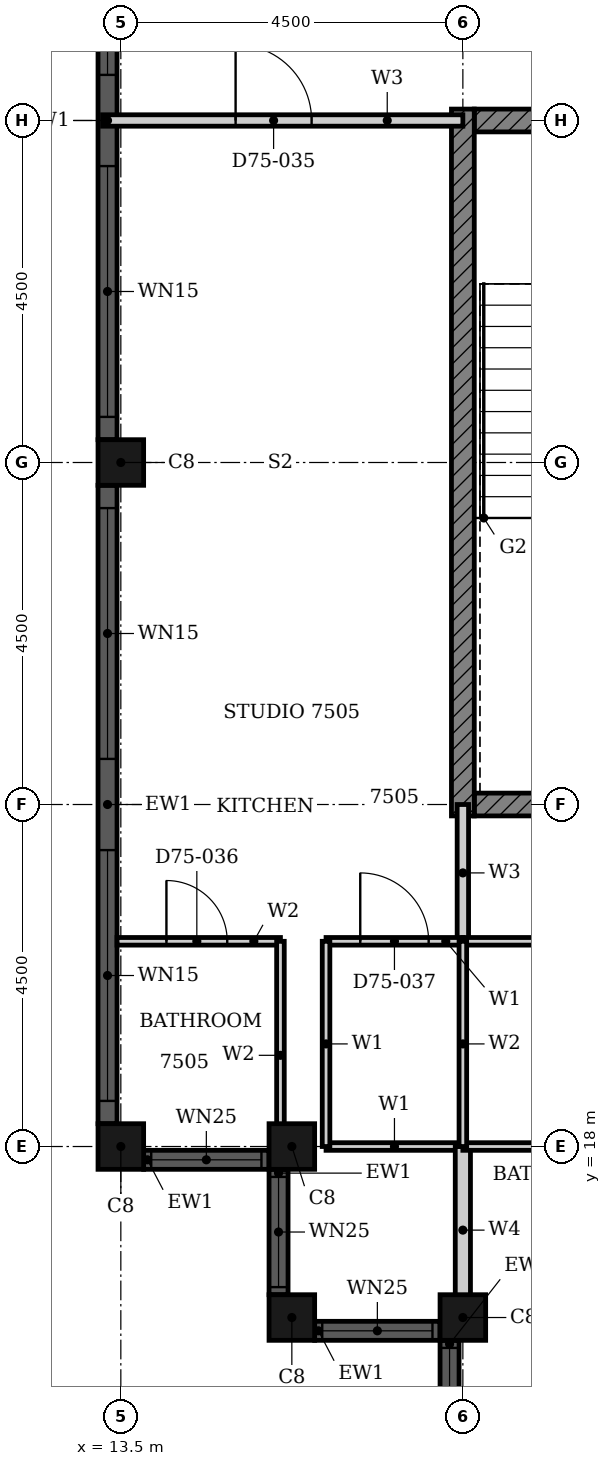
"""IFC4 building model, lengths in metres.
Left out: names, types, materials, properties, quantities, classifications, styles, units other than length and angle.
Written with IfcOpenShell. Run it as: python <this file> out.ifc"""

import sys

from ifc_helpers import new_model, si_unit, direction, frame, frame_2d, origin, origin_2d, place, context, subcontext, project, spatial, rectangle, hollow_rectangle, extrude, element, fill, save


model = new_model("IFC4")
c1 = context("Model", 3, precision=1e-05, world=origin(), true_north=direction((0.0, 1.0)))
c2 = subcontext(c1, "Body", "Model", "MODEL_VIEW")
j1 = project(units=[si_unit("LENGTHUNIT", "METRE"), si_unit("PLANEANGLEUNIT", "RADIAN")], contexts=[c1])
p1 = place(None, origin())
s1 = spatial("IfcSite", under=j1, at=p1, CompositionType="ELEMENT")
p2 = place(p1, origin())
s2 = spatial("IfcBuilding", under=s1, at=p2, CompositionType="ELEMENT")
p3 = place(p2, frame((0.0, 0.0, 294.5)))
s3 = spatial("IfcBuildingStorey", under=s2, at=p3, CompositionType="ELEMENT", Elevation=294.5)
for number, where, z_axis, x_axis in (
    (1, (13.5, 27.0, 0.0), (0.0, 0.0, 1.0), (1.0, 0.0, 0.0)),
    (2, (13.5, 18.0, 0.0), (0.0, 0.0, 1.0), (1.0, 0.0, 0.0)),
    (3, (15.75, 18.0, 0.0), (0.0, 0.0, 1.0), (1.0, 0.0, 0.0)),
    (4, (15.75, 15.75, 0.0), (0.0, 0.0, 1.0), (1.0, 0.0, 0.0)),
    (5, (18.0, 15.75, 0.0), (0.0, 0.0, 1.0), (1.0, 0.0, 0.0)),
):
    element("IfcColumn", number, at=place(p3, frame(where, z_axis=z_axis, x_axis=x_axis)), inside=s3, PredefinedType="COLUMN", context=c2, shape_type="SweptSolid", body=[
        extrude(hollow_rectangle(XDim=0.6, YDim=0.6, WallThickness=0.02, at=origin_2d()), origin(), (0.0, 0.0, 1.0), 3.7),
    ])
p4 = place(p3, frame((13.325, 35.7, 0.0), z_axis=(0.0, 0.0, 1.0), x_axis=(0.0, -1.0, 0.0)))
e6 = element("IfcWall", 6, at=p4, inside=s3, PredefinedType="SOLIDWALL", context=c2, shape_type="SweptSolid", body=[
    extrude(rectangle(XDim=8.4, YDim=0.25, at=frame_2d((4.2, 0.0))), origin(), (0.0, 0.0, 1.0), 3.7),
])
p5 = place(p4, frame((0.3, 0.0, 0.45)))
e7 = element("IfcOpeningElement", 7, at=p5, cuts=e6, PredefinedType="OPENING", context=c2, shape_type="SweptSolid", body=[
    extrude(rectangle(XDim=3.3, YDim=2.3, at=frame_2d((1.65, 1.15))), frame((0.0, 0.135, 0.0), z_axis=(0.0, -1.0, 0.0), x_axis=(1.0, 0.0, 0.0)), (0.0, 0.0, 1.0), 0.27),
])
p6 = place(p4, frame((4.8, 0.0, 0.45)))
e8 = element("IfcOpeningElement", 8, at=p6, cuts=e6, PredefinedType="OPENING", context=c2, shape_type="SweptSolid", body=[
    extrude(rectangle(XDim=3.3, YDim=2.3, at=frame_2d((1.65, 1.15))), frame((0.0, 0.135, 0.0), z_axis=(0.0, -1.0, 0.0), x_axis=(1.0, 0.0, 0.0)), (0.0, 0.0, 1.0), 0.27),
])
p7 = place(p3, frame((13.325, 26.7, 0.0), z_axis=(0.0, 0.0, 1.0), x_axis=(0.0, -1.0, 0.0)))
e9 = element("IfcWall", 9, at=p7, inside=s3, PredefinedType="SOLIDWALL", context=c2, shape_type="SweptSolid", body=[
    extrude(rectangle(XDim=8.4, YDim=0.25, at=frame_2d((4.2, 0.0))), origin(), (0.0, 0.0, 1.0), 3.7),
])
p8 = place(p7, frame((0.3, 0.0, 0.45)))
e10 = element("IfcOpeningElement", 10, at=p8, cuts=e9, PredefinedType="OPENING", context=c2, shape_type="SweptSolid", body=[
    extrude(rectangle(XDim=3.3, YDim=2.3, at=frame_2d((1.65, 1.15))), frame((0.0, 0.135, 0.0), z_axis=(0.0, -1.0, 0.0), x_axis=(1.0, 0.0, 0.0)), (0.0, 0.0, 1.0), 0.27),
])
p9 = place(p7, frame((4.8, 0.0, 0.45)))
e11 = element("IfcOpeningElement", 11, at=p9, cuts=e9, PredefinedType="OPENING", context=c2, shape_type="SweptSolid", body=[
    extrude(rectangle(XDim=3.3, YDim=2.3, at=frame_2d((1.65, 1.15))), frame((0.0, 0.135, 0.0), z_axis=(0.0, -1.0, 0.0), x_axis=(1.0, 0.0, 0.0)), (0.0, 0.0, 1.0), 0.27),
])
p10 = place(p3, frame((13.8, 17.825, 0.0), z_axis=(0.0, 0.0, 1.0), x_axis=(1.0, 0.0, 0.0)))
e12 = element("IfcWall", 12, at=p10, inside=s3, PredefinedType="SOLIDWALL", context=c2, shape_type="SweptSolid", body=[
    extrude(rectangle(XDim=1.65, YDim=0.25, at=frame_2d((0.825, 0.0))), origin(), (0.0, 0.0, 1.0), 3.7),
])
p11 = place(p10, frame((0.1, 0.0, 0.9)))
e13 = element("IfcOpeningElement", 13, at=p11, cuts=e12, PredefinedType="OPENING", context=c2, shape_type="SweptSolid", body=[
    extrude(rectangle(XDim=1.45, YDim=1.85, at=frame_2d((0.725, 0.925))), frame((0.0, 0.135, 0.0), z_axis=(0.0, -1.0, 0.0), x_axis=(1.0, 0.0, 0.0)), (0.0, 0.0, 1.0), 0.27),
])
p12 = place(p3, frame((15.575, 17.7, 0.0), z_axis=(0.0, 0.0, 1.0), x_axis=(0.0, -1.0, 0.0)))
e14 = element("IfcWall", 14, at=p12, inside=s3, PredefinedType="SOLIDWALL", context=c2, shape_type="SweptSolid", body=[
    extrude(rectangle(XDim=1.65, YDim=0.25, at=frame_2d((0.825, 0.0))), origin(), (0.0, 0.0, 1.0), 3.7),
])
p13 = place(p12, frame((0.1, 0.0, 0.9)))
e15 = element("IfcOpeningElement", 15, at=p13, cuts=e14, PredefinedType="OPENING", context=c2, shape_type="SweptSolid", body=[
    extrude(rectangle(XDim=1.45, YDim=1.85, at=frame_2d((0.725, 0.925))), frame((0.0, 0.135, 0.0), z_axis=(0.0, -1.0, 0.0), x_axis=(1.0, 0.0, 0.0)), (0.0, 0.0, 1.0), 0.27),
])
p14 = place(p3, frame((16.05, 15.575, 0.0), z_axis=(0.0, 0.0, 1.0), x_axis=(1.0, 0.0, 0.0)))
e16 = element("IfcWall", 16, at=p14, inside=s3, PredefinedType="SOLIDWALL", context=c2, shape_type="SweptSolid", body=[
    extrude(rectangle(XDim=1.65, YDim=0.25, at=frame_2d((0.825, 0.0))), origin(), (0.0, 0.0, 1.0), 3.7),
])
p15 = place(p14, frame((0.1, 0.0, 0.9)))
e17 = element("IfcOpeningElement", 17, at=p15, cuts=e16, PredefinedType="OPENING", context=c2, shape_type="SweptSolid", body=[
    extrude(rectangle(XDim=1.45, YDim=1.85, at=frame_2d((0.725, 0.925))), frame((0.0, 0.135, 0.0), z_axis=(0.0, -1.0, 0.0), x_axis=(1.0, 0.0, 0.0)), (0.0, 0.0, 1.0), 0.27),
])
p16 = place(p3, frame((17.825, 15.45, 0.0), z_axis=(0.0, 0.0, 1.0), x_axis=(0.0, -1.0, 0.0)))
e18 = element("IfcWall", 18, at=p16, inside=s3, PredefinedType="SOLIDWALL", context=c2, shape_type="SweptSolid", body=[
    extrude(rectangle(XDim=1.65, YDim=0.25, at=frame_2d((0.825, 0.0))), origin(), (0.0, 0.0, 1.0), 3.7),
])
p17 = place(p16, frame((0.1, 0.0, 0.9)))
e19 = element("IfcOpeningElement", 19, at=p17, cuts=e18, PredefinedType="OPENING", context=c2, shape_type="SweptSolid", body=[
    extrude(rectangle(XDim=1.45, YDim=1.85, at=frame_2d((0.725, 0.925))), frame((0.0, 0.135, 0.0), z_axis=(0.0, -1.0, 0.0), x_axis=(1.0, 0.0, 0.0)), (0.0, 0.0, 1.0), 0.27),
])
p18 = place(p3, frame((18.15, 22.5, 0.0), z_axis=(0.0, 0.0, 1.0), x_axis=(1.0, 0.0, 0.0)))
e20 = element("IfcWall", 20, at=p18, inside=s3, PredefinedType="SHEAR", context=c2, shape_type="SweptSolid", body=[
    extrude(rectangle(XDim=4.225, YDim=0.3, at=frame_2d((2.113, 0.0))), origin(), (0.0, 0.0, 1.0), 3.4),
])
p19 = place(p3, frame((18.15, 31.5, 0.0), z_axis=(0.0, 0.0, 1.0), x_axis=(1.0, 0.0, 0.0)))
e21 = element("IfcWall", 21, at=p19, inside=s3, PredefinedType="SHEAR", context=c2, shape_type="SweptSolid", body=[
    extrude(rectangle(XDim=9.368, YDim=0.3, at=frame_2d((4.684, 0.0))), origin(), (0.0, 0.0, 1.0), 3.4),
])
p20 = place(p19, frame((4.736, 0.0, 0.0)))
e22 = element("IfcOpeningElement", 22, at=p20, cuts=e21, PredefinedType="OPENING", context=c2, shape_type="SweptSolid", body=[
    extrude(rectangle(XDim=1.8, YDim=2.1, at=frame_2d((0.9, 1.05))), frame((0.0, 0.16, 0.0), z_axis=(0.0, -1.0, 0.0), x_axis=(1.0, 0.0, 0.0)), (0.0, 0.0, 1.0), 0.32),
])
p21 = place(p3, frame((18.0, 22.35, 0.0), z_axis=(0.0, 0.0, 1.0), x_axis=(0.0, 1.0, 0.0)))
e23 = element("IfcWall", 23, at=p21, inside=s3, PredefinedType="SHEAR", context=c2, shape_type="SweptSolid", body=[
    extrude(rectangle(XDim=9.3, YDim=0.3, at=frame_2d((4.65, 0.0))), origin(), (0.0, 0.0, 1.0), 3.4),
])
p22 = place(p3, frame((13.26, 31.5, 0.0), z_axis=(0.0, 0.0, 1.0), x_axis=(1.0, 0.0, 0.0)))
e24 = element("IfcWall", 24, at=p22, inside=s3, PredefinedType="PARTITIONING", context=c2, shape_type="SweptSolid", body=[
    extrude(rectangle(XDim=4.74, YDim=0.15, at=frame_2d((2.37, 0.0))), origin(), (0.0, 0.0, 1.0), 3.4),
])
p23 = place(p22, frame((1.75, 0.0, 0.0)))
e25 = element("IfcOpeningElement", 25, at=p23, cuts=e24, PredefinedType="OPENING", context=c2, shape_type="SweptSolid", body=[
    extrude(rectangle(XDim=1.0, YDim=2.2, at=frame_2d((0.5, 1.1))), frame((0.0, 0.085, 0.0), z_axis=(0.0, -1.0, 0.0), x_axis=(1.0, 0.0, 0.0)), (0.0, 0.0, 1.0), 0.17),
])
p24 = place(p3, frame((18.0, 20.7, 0.0), z_axis=(0.0, 0.0, 1.0), x_axis=(0.0, 1.0, 0.0)))
e26 = element("IfcWall", 26, at=p24, inside=s3, PredefinedType="PARTITIONING", context=c2, shape_type="SweptSolid", body=[
    extrude(rectangle(XDim=1.8, YDim=0.15, at=frame_2d((0.9, 0.0))), origin(), (0.0, 0.0, 1.0), 3.4),
])
p25 = place(p3, frame((16.2, 18.0, 0.0), z_axis=(0.0, 0.0, 1.0), x_axis=(1.0, 0.0, 0.0)))
e27 = element("IfcWall", 27, at=p25, inside=s3, PredefinedType="PARTITIONING", context=c2, shape_type="SweptSolid", body=[
    extrude(rectangle(XDim=1.8, YDim=0.1, at=frame_2d((0.9, 0.0))), origin(), (0.0, 0.0, 1.0), 3.4),
])
p26 = place(p3, frame((16.2, 20.7, 0.0), z_axis=(0.0, 0.0, 1.0), x_axis=(1.0, 0.0, 0.0)))
e28 = element("IfcWall", 28, at=p26, inside=s3, PredefinedType="PARTITIONING", context=c2, shape_type="SweptSolid", body=[
    extrude(rectangle(XDim=1.8, YDim=0.1, at=frame_2d((0.9, 0.0))), origin(), (0.0, 0.0, 1.0), 3.4),
])
p27 = place(p26, frame((0.45, 0.0, 0.0)))
e29 = element("IfcOpeningElement", 29, at=p27, cuts=e28, PredefinedType="OPENING", context=c2, shape_type="SweptSolid", body=[
    extrude(rectangle(XDim=0.9, YDim=2.1, at=frame_2d((0.45, 1.05))), frame((0.0, 0.06, 0.0), z_axis=(0.0, -1.0, 0.0), x_axis=(1.0, 0.0, 0.0)), (0.0, 0.0, 1.0), 0.12),
])
p28 = place(p3, frame((16.2, 18.0, 0.0), z_axis=(0.0, 0.0, 1.0), x_axis=(0.0, 1.0, 0.0)))
e30 = element("IfcWall", 30, at=p28, inside=s3, PredefinedType="PARTITIONING", context=c2, shape_type="SweptSolid", body=[
    extrude(rectangle(XDim=2.7, YDim=0.1, at=frame_2d((1.35, 0.0))), origin(), (0.0, 0.0, 1.0), 3.4),
])
p29 = place(p3, frame((18.0, 15.8, 0.0), z_axis=(0.0, 0.0, 1.0), x_axis=(0.0, 1.0, 0.0)))
e31 = element("IfcWall", 31, at=p29, inside=s3, PredefinedType="PARTITIONING", context=c2, shape_type="SweptSolid", body=[
    extrude(rectangle(XDim=2.2, YDim=0.2, at=frame_2d((1.1, 0.0))), origin(), (0.0, 0.0, 1.0), 3.4),
])
for number, where, z_axis, x_axis in (
    (32, (18.0, 18.0, 0.0), (0.0, 0.0, 1.0), (1.0, 0.0, 0.0)),
    (33, (18.0, 20.7, 0.0), (0.0, 0.0, 1.0), (1.0, 0.0, 0.0)),
):
    element("IfcWall", number, at=place(p3, frame(where, z_axis=z_axis, x_axis=x_axis)), inside=s3, PredefinedType="PARTITIONING", context=c2, shape_type="SweptSolid", body=[
        extrude(rectangle(XDim=2.4, YDim=0.1, at=frame_2d((1.2, 0.0))), origin(), (0.0, 0.0, 1.0), 3.4),
    ])
p30 = place(p3, frame((13.45, 20.7, 0.0), z_axis=(0.0, 0.0, 1.0), x_axis=(1.0, 0.0, 0.0)))
e34 = element("IfcWall", 34, at=p30, inside=s3, PredefinedType="PARTITIONING", context=c2, shape_type="SweptSolid", body=[
    extrude(rectangle(XDim=2.15, YDim=0.1, at=frame_2d((1.075, 0.0))), origin(), (0.0, 0.0, 1.0), 3.4),
])
p31 = place(p30, frame((0.65, 0.0, 0.0)))
e35 = element("IfcOpeningElement", 35, at=p31, cuts=e34, PredefinedType="OPENING", context=c2, shape_type="SweptSolid", body=[
    extrude(rectangle(XDim=0.8, YDim=2.1, at=frame_2d((0.4, 1.05))), frame((0.0, 0.06, 0.0), z_axis=(0.0, -1.0, 0.0), x_axis=(1.0, 0.0, 0.0)), (0.0, 0.0, 1.0), 0.12),
])
p32 = place(p3, frame((15.6, 17.7, 0.0), z_axis=(0.0, 0.0, 1.0), x_axis=(0.0, 1.0, 0.0)))
e36 = element("IfcWall", 36, at=p32, inside=s3, PredefinedType="PARTITIONING", context=c2, shape_type="SweptSolid", body=[
    extrude(rectangle(XDim=3.0, YDim=0.1, at=frame_2d((1.5, 0.0))), origin(), (0.0, 0.0, 1.0), 3.4),
])
p33 = place(p3, frame((18.0, 18.0, 0.0), z_axis=(0.0, 0.0, 1.0), x_axis=(0.0, 1.0, 0.0)))
e37 = element("IfcWall", 37, at=p33, inside=s3, PredefinedType="PARTITIONING", context=c2, shape_type="SweptSolid", body=[
    extrude(rectangle(XDim=2.7, YDim=0.1, at=frame_2d((1.35, 0.0))), origin(), (0.0, 0.0, 1.0), 3.4),
])
p34 = place(p5, origin())
e38 = element("IfcWindow", 38, at=p34, inside=s3, PartitioningType="SINGLE_PANEL", PredefinedType="WINDOW", context=c2, shape_type="SweptSolid", body=[
    extrude(rectangle(XDim=3.3, YDim=2.3, at=frame_2d((1.65, 1.15))), frame((0.0, 0.03, 0.0), z_axis=(0.0, -1.0, 0.0), x_axis=(1.0, 0.0, 0.0)), (0.0, 0.0, 1.0), 0.06),
])
fill(e7, e38)
p35 = place(p6, origin())
e39 = element("IfcWindow", 39, at=p35, inside=s3, PartitioningType="SINGLE_PANEL", PredefinedType="WINDOW", context=c2, shape_type="SweptSolid", body=[
    extrude(rectangle(XDim=3.3, YDim=2.3, at=frame_2d((1.65, 1.15))), frame((0.0, 0.03, 0.0), z_axis=(0.0, -1.0, 0.0), x_axis=(1.0, 0.0, 0.0)), (0.0, 0.0, 1.0), 0.06),
])
fill(e8, e39)
p36 = place(p8, origin())
e40 = element("IfcWindow", 40, at=p36, inside=s3, PartitioningType="SINGLE_PANEL", PredefinedType="WINDOW", context=c2, shape_type="SweptSolid", body=[
    extrude(rectangle(XDim=3.3, YDim=2.3, at=frame_2d((1.65, 1.15))), frame((0.0, 0.03, 0.0), z_axis=(0.0, -1.0, 0.0), x_axis=(1.0, 0.0, 0.0)), (0.0, 0.0, 1.0), 0.06),
])
fill(e10, e40)
p37 = place(p9, origin())
e41 = element("IfcWindow", 41, at=p37, inside=s3, PartitioningType="SINGLE_PANEL", PredefinedType="WINDOW", context=c2, shape_type="SweptSolid", body=[
    extrude(rectangle(XDim=3.3, YDim=2.3, at=frame_2d((1.65, 1.15))), frame((0.0, 0.03, 0.0), z_axis=(0.0, -1.0, 0.0), x_axis=(1.0, 0.0, 0.0)), (0.0, 0.0, 1.0), 0.06),
])
fill(e11, e41)
p38 = place(p11, origin())
e42 = element("IfcWindow", 42, at=p38, inside=s3, PartitioningType="SINGLE_PANEL", PredefinedType="WINDOW", context=c2, shape_type="SweptSolid", body=[
    extrude(rectangle(XDim=1.45, YDim=1.85, at=frame_2d((0.725, 0.925))), frame((0.0, 0.03, 0.0), z_axis=(0.0, -1.0, 0.0), x_axis=(1.0, 0.0, 0.0)), (0.0, 0.0, 1.0), 0.06),
])
fill(e13, e42)
p39 = place(p13, origin())
e43 = element("IfcWindow", 43, at=p39, inside=s3, PartitioningType="SINGLE_PANEL", PredefinedType="WINDOW", context=c2, shape_type="SweptSolid", body=[
    extrude(rectangle(XDim=1.45, YDim=1.85, at=frame_2d((0.725, 0.925))), frame((0.0, 0.03, 0.0), z_axis=(0.0, -1.0, 0.0), x_axis=(1.0, 0.0, 0.0)), (0.0, 0.0, 1.0), 0.06),
])
fill(e15, e43)
p40 = place(p15, origin())
e44 = element("IfcWindow", 44, at=p40, inside=s3, PartitioningType="SINGLE_PANEL", PredefinedType="WINDOW", context=c2, shape_type="SweptSolid", body=[
    extrude(rectangle(XDim=1.45, YDim=1.85, at=frame_2d((0.725, 0.925))), frame((0.0, 0.03, 0.0), z_axis=(0.0, -1.0, 0.0), x_axis=(1.0, 0.0, 0.0)), (0.0, 0.0, 1.0), 0.06),
])
fill(e17, e44)
p41 = place(p17, origin())
e45 = element("IfcWindow", 45, at=p41, inside=s3, PartitioningType="SINGLE_PANEL", PredefinedType="WINDOW", context=c2, shape_type="SweptSolid", body=[
    extrude(rectangle(XDim=1.45, YDim=1.85, at=frame_2d((0.725, 0.925))), frame((0.0, 0.03, 0.0), z_axis=(0.0, -1.0, 0.0), x_axis=(1.0, 0.0, 0.0)), (0.0, 0.0, 1.0), 0.06),
])
fill(e19, e45)
p42 = place(p23, origin())
e46 = element("IfcDoor", 46, at=p42, inside=s3, OperationType="SINGLE_SWING_LEFT", PredefinedType="DOOR", context=c2, shape_type="SweptSolid", body=[
    extrude(rectangle(XDim=1.0, YDim=2.2, at=frame_2d((0.5, 1.1))), frame((0.0, 0.025, 0.0), z_axis=(0.0, -1.0, 0.0), x_axis=(1.0, 0.0, 0.0)), (0.0, 0.0, 1.0), 0.05),
])
fill(e25, e46)
p43 = place(p31, origin())
e47 = element("IfcDoor", 47, at=p43, inside=s3, OperationType="SINGLE_SWING_LEFT", PredefinedType="DOOR", context=c2, shape_type="SweptSolid", body=[
    extrude(rectangle(XDim=0.8, YDim=2.1, at=frame_2d((0.4, 1.05))), frame((0.0, 0.025, 0.0), z_axis=(0.0, -1.0, 0.0), x_axis=(1.0, 0.0, 0.0)), (0.0, 0.0, 1.0), 0.05),
])
fill(e35, e47)
p44 = place(p27, origin())
e48 = element("IfcDoor", 48, at=p44, inside=s3, OperationType="SINGLE_SWING_LEFT", PredefinedType="DOOR", context=c2, shape_type="SweptSolid", body=[
    extrude(rectangle(XDim=0.9, YDim=2.1, at=frame_2d((0.45, 1.05))), frame((0.0, 0.025, 0.0), z_axis=(0.0, -1.0, 0.0), x_axis=(1.0, 0.0, 0.0)), (0.0, 0.0, 1.0), 0.05),
])
fill(e29, e48)
save(model, sys.argv[1])
